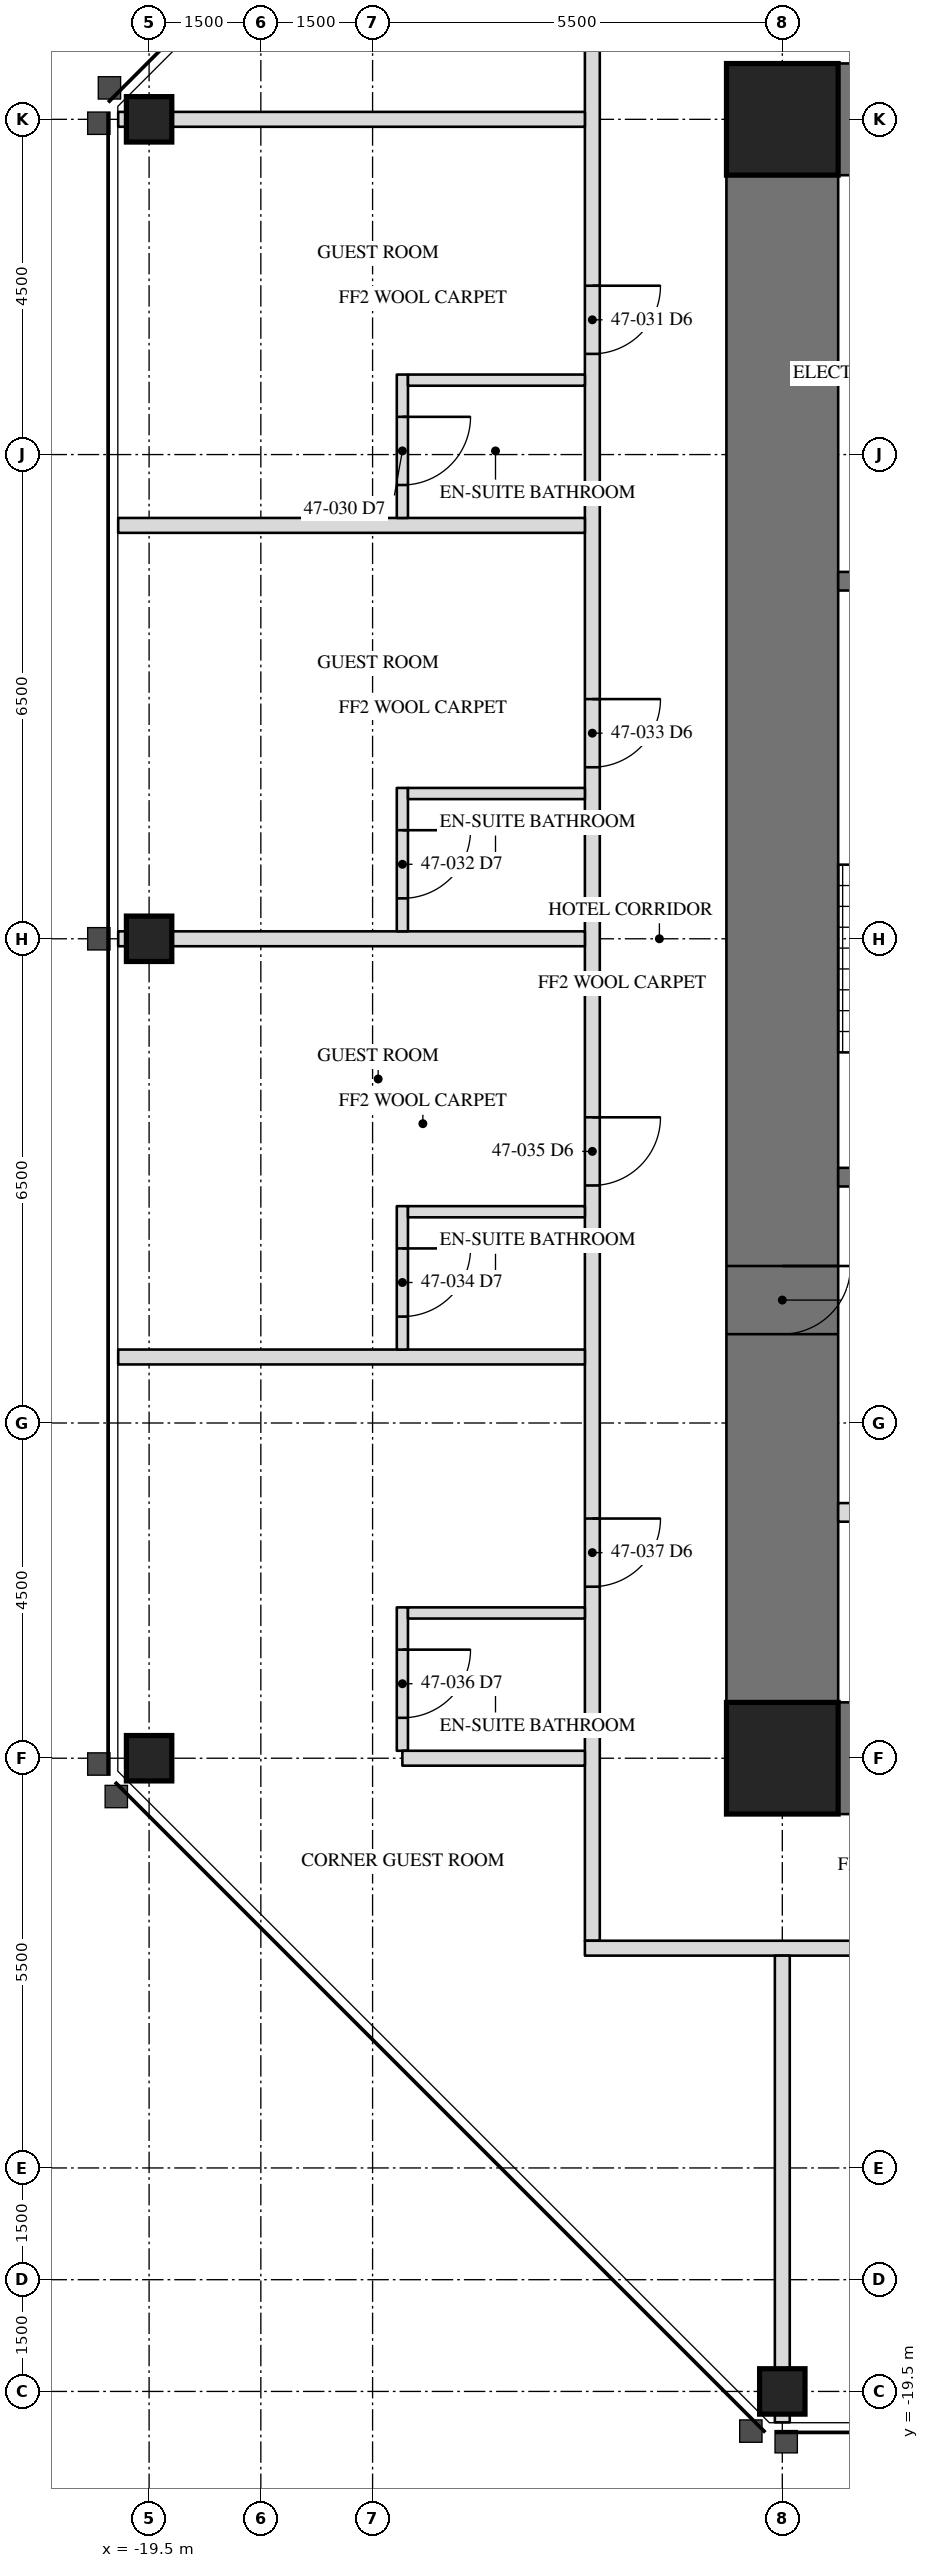
"""IFC4 building model, lengths in metres.
Left out: names, types, materials, properties, quantities, classifications, styles, units other than length and angle.
Written with IfcOpenShell. Run it as: python <this file> out.ifc"""

import sys

from ifc_helpers import new_model, si_unit, direction, frame, frame_2d, origin, origin_2d, place, context, subcontext, project, spatial, rectangle, hollow_rectangle, extrude, element, fill, save


model = new_model("IFC4")
c1 = context("Model", 3, precision=1e-05, world=origin(), true_north=direction((0.0, 1.0)))
c2 = subcontext(c1, "Body", "Model", "MODEL_VIEW")
j1 = project(units=[si_unit("LENGTHUNIT", "METRE"), si_unit("PLANEANGLEUNIT", "RADIAN")], contexts=[c1])
p1 = place(None, origin())
s1 = spatial("IfcSite", under=j1, at=p1, CompositionType="ELEMENT")
p2 = place(p1, origin())
s2 = spatial("IfcBuilding", under=s1, at=p2, CompositionType="ELEMENT")
p3 = place(p2, frame((0.0, 0.0, 201.2)))
s3 = spatial("IfcBuildingStorey", under=s2, at=p3, CompositionType="ELEMENT", Elevation=201.2)
for number, where, z_axis, x_axis in (
    (1, (-19.5, 0.0, 0.0), (0.0, 0.0, 1.0), (0.0, 1.0, 0.0)),
    (2, (-19.5, -11.0, 0.0), (0.0, 0.0, 1.0), (0.0, 1.0, 0.0)),
    (3, (-11.0, -19.5, 0.0), (0.0, 0.0, 1.0), (1.0, 0.0, 0.0)),
    (4, (-19.5, 11.0, 0.0), (0.0, 0.0, 1.0), (0.0, 1.0, 0.0)),
):
    element("IfcColumn", number, at=place(p3, frame(where, z_axis=z_axis, x_axis=x_axis)), inside=s3, PredefinedType="COLUMN", context=c2, shape_type="SweptSolid", body=[
        extrude(hollow_rectangle(XDim=0.61, YDim=0.61, WallThickness=0.076, at=origin_2d()), origin(), (0.0, 0.0, 1.0), 3.5),
    ])
p4 = place(p3, frame((-11.0, 11.0, 0.0), z_axis=(0.0, 0.0, 1.0), x_axis=(0.0, -1.0, 0.0)))
e5 = element("IfcWall", 5, at=p4, inside=s3, PredefinedType="SHEAR", context=c2, shape_type="SweptSolid", body=[
    extrude(rectangle(XDim=22.0, YDim=1.5, at=frame_2d((11.0, 0.0))), origin(), (0.0, 0.0, 1.0), 3.5),
])
p5 = place(p4, frame((15.393, 0.0, 0.0)))
e6 = element("IfcOpeningElement", 6, at=p5, cuts=e5, PredefinedType="OPENING", context=c2, shape_type="SweptSolid", body=[
    extrude(rectangle(XDim=0.915, YDim=2.134, at=frame_2d((0.458, 1.067))), frame((0.0, 0.76, 0.0), z_axis=(0.0, -1.0, 0.0), x_axis=(1.0, 0.0, 0.0)), (0.0, 0.0, 1.0), 1.52),
])
for number, where, z_axis, x_axis in (
    (7, (-6.5, 11.0, 0.0), (0.0, 0.0, 1.0), (-1.0, 0.0, 0.0)),
    (8, (-11.0, -11.0, 0.0), (0.0, 0.0, 1.0), (1.0, 0.0, 0.0)),
):
    element("IfcWall", number, at=place(p3, frame(where, z_axis=z_axis, x_axis=x_axis)), inside=s3, PredefinedType="SHEAR", context=c2, shape_type="SweptSolid", body=[
        extrude(rectangle(XDim=4.5, YDim=1.5, at=frame_2d((2.25, 0.0))), origin(), (0.0, 0.0, 1.0), 3.5),
    ])
for number, where, z_axis, x_axis in (
    (9, (-11.0, 11.0, 0.0), (0.0, 0.0, 1.0), (1.0, 0.0, 0.0)),
    (10, (-11.0, -11.0, 0.0), (0.0, 0.0, 1.0), (1.0, 0.0, 0.0)),
):
    element("IfcColumn", number, at=place(p3, frame(where, z_axis=z_axis, x_axis=x_axis)), inside=s3, PredefinedType="COLUMN", context=c2, shape_type="SweptSolid", body=[
        extrude(hollow_rectangle(XDim=1.499, YDim=1.499, WallThickness=0.102, at=origin_2d()), origin(), (0.0, 0.0, 1.0), 3.5),
    ])
p6 = place(p3, frame((-6.95, 4.8, 0.0), z_axis=(0.0, 0.0, 1.0), x_axis=(-1.0, 0.0, 0.0)))
e11 = element("IfcWall", 11, at=p6, inside=s3, PredefinedType="SOLIDWALL", context=c2, shape_type="SweptSolid", body=[
    extrude(rectangle(XDim=3.3, YDim=0.25, at=frame_2d((1.65, 0.0))), origin(), (0.0, 0.0, 1.0), 3.31),
])
p7 = place(p3, frame((-6.95, -3.2, 0.0), z_axis=(0.0, 0.0, 1.0), x_axis=(-1.0, 0.0, 0.0)))
e12 = element("IfcWall", 12, at=p7, inside=s3, PredefinedType="SOLIDWALL", context=c2, shape_type="SweptSolid", body=[
    extrude(rectangle(XDim=3.3, YDim=0.25, at=frame_2d((1.65, 0.0))), origin(), (0.0, 0.0, 1.0), 3.31),
])
p8 = place(p7, frame((1.116, 0.0, 0.0)))
e13 = element("IfcOpeningElement", 13, at=p8, cuts=e12, PredefinedType="OPENING", context=c2, shape_type="SweptSolid", body=[
    extrude(rectangle(XDim=1.067, YDim=2.134, at=frame_2d((0.533, 1.067))), frame((0.0, 0.135, 0.0), z_axis=(0.0, -1.0, 0.0), x_axis=(1.0, 0.0, 0.0)), (0.0, 0.0, 1.0), 0.27),
])
p9 = place(p3, frame((-6.95, -7.7, 0.0), z_axis=(0.0, 0.0, 1.0), x_axis=(-1.0, 0.0, 0.0)))
e14 = element("IfcWall", 14, at=p9, inside=s3, PredefinedType="PARTITIONING", context=c2, shape_type="SweptSolid", body=[
    extrude(rectangle(XDim=3.3, YDim=0.25, at=frame_2d((1.65, 0.0))), origin(), (0.0, 0.0, 1.0), 3.31),
])
p10 = place(p9, frame((0.45, 0.0, 0.0)))
e15 = element("IfcOpeningElement", 15, at=p10, cuts=e14, PredefinedType="OPENING", context=c2, shape_type="SweptSolid", body=[
    extrude(rectangle(XDim=1.219, YDim=2.134, at=frame_2d((0.609, 1.067))), frame((0.0, 0.135, 0.0), z_axis=(0.0, -1.0, 0.0), x_axis=(1.0, 0.0, 0.0)), (0.0, 0.0, 1.0), 0.27),
])
p11 = place(p3, frame((-13.55, 13.65, 0.0), z_axis=(0.0, 0.0, 1.0), x_axis=(0.0, -1.0, 0.0)))
e16 = element("IfcWall", 16, at=p11, inside=s3, PredefinedType="PARTITIONING", context=c2, shape_type="SweptSolid", body=[
    extrude(rectangle(XDim=27.1, YDim=0.2, at=frame_2d((13.55, 0.0))), origin(), (0.0, 0.0, 1.0), 3.31),
])
p12 = place(p11, frame((4.884, 0.0, 0.0)))
e17 = element("IfcOpeningElement", 17, at=p12, cuts=e16, PredefinedType="OPENING", context=c2, shape_type="SweptSolid", body=[
    extrude(rectangle(XDim=0.915, YDim=2.134, at=frame_2d((0.458, 1.067))), frame((0.0, 0.11, 0.0), z_axis=(0.0, -1.0, 0.0), x_axis=(1.0, 0.0, 0.0)), (0.0, 0.0, 1.0), 0.22),
])
p13 = place(p11, frame((10.433, 0.0, 0.0)))
e18 = element("IfcOpeningElement", 18, at=p13, cuts=e16, PredefinedType="OPENING", context=c2, shape_type="SweptSolid", body=[
    extrude(rectangle(XDim=0.915, YDim=2.134, at=frame_2d((0.458, 1.067))), frame((0.0, 0.11, 0.0), z_axis=(0.0, -1.0, 0.0), x_axis=(1.0, 0.0, 0.0)), (0.0, 0.0, 1.0), 0.22),
])
p14 = place(p11, frame((16.046, 0.0, 0.0)))
e19 = element("IfcOpeningElement", 19, at=p14, cuts=e16, PredefinedType="OPENING", context=c2, shape_type="SweptSolid", body=[
    extrude(rectangle(XDim=0.915, YDim=2.134, at=frame_2d((0.458, 1.067))), frame((0.0, 0.11, 0.0), z_axis=(0.0, -1.0, 0.0), x_axis=(1.0, 0.0, 0.0)), (0.0, 0.0, 1.0), 0.22),
])
p15 = place(p11, frame((21.433, 0.0, 0.0)))
e20 = element("IfcOpeningElement", 20, at=p15, cuts=e16, PredefinedType="OPENING", context=c2, shape_type="SweptSolid", body=[
    extrude(rectangle(XDim=0.915, YDim=2.134, at=frame_2d((0.458, 1.067))), frame((0.0, 0.11, 0.0), z_axis=(0.0, -1.0, 0.0), x_axis=(1.0, 0.0, 0.0)), (0.0, 0.0, 1.0), 0.22),
])
p16 = place(p3, frame((-13.65, -13.55, 0.0), z_axis=(0.0, 0.0, 1.0), x_axis=(1.0, 0.0, 0.0)))
e21 = element("IfcWall", 21, at=p16, inside=s3, PredefinedType="PARTITIONING", context=c2, shape_type="SweptSolid", body=[
    extrude(rectangle(XDim=27.1, YDim=0.2, at=frame_2d((13.55, 0.0))), origin(), (0.0, 0.0, 1.0), 3.31),
])
p17 = place(p16, frame((4.884, 0.0, 0.0)))
e22 = element("IfcOpeningElement", 22, at=p17, cuts=e21, PredefinedType="OPENING", context=c2, shape_type="SweptSolid", body=[
    extrude(rectangle(XDim=0.915, YDim=2.134, at=frame_2d((0.458, 1.067))), frame((0.0, 0.11, 0.0), z_axis=(0.0, -1.0, 0.0), x_axis=(1.0, 0.0, 0.0)), (0.0, 0.0, 1.0), 0.22),
])
p18 = place(p16, frame((10.433, 0.0, 0.0)))
e23 = element("IfcOpeningElement", 23, at=p18, cuts=e21, PredefinedType="OPENING", context=c2, shape_type="SweptSolid", body=[
    extrude(rectangle(XDim=0.915, YDim=2.134, at=frame_2d((0.458, 1.067))), frame((0.0, 0.11, 0.0), z_axis=(0.0, -1.0, 0.0), x_axis=(1.0, 0.0, 0.0)), (0.0, 0.0, 1.0), 0.22),
])
p19 = place(p16, frame((16.046, 0.0, 0.0)))
e24 = element("IfcOpeningElement", 24, at=p19, cuts=e21, PredefinedType="OPENING", context=c2, shape_type="SweptSolid", body=[
    extrude(rectangle(XDim=0.915, YDim=2.134, at=frame_2d((0.458, 1.067))), frame((0.0, 0.11, 0.0), z_axis=(0.0, -1.0, 0.0), x_axis=(1.0, 0.0, 0.0)), (0.0, 0.0, 1.0), 0.22),
])
p20 = place(p16, frame((21.433, 0.0, 0.0)))
e25 = element("IfcOpeningElement", 25, at=p20, cuts=e21, PredefinedType="OPENING", context=c2, shape_type="SweptSolid", body=[
    extrude(rectangle(XDim=0.915, YDim=2.134, at=frame_2d((0.458, 1.067))), frame((0.0, 0.11, 0.0), z_axis=(0.0, -1.0, 0.0), x_axis=(1.0, 0.0, 0.0)), (0.0, 0.0, 1.0), 0.22),
])
p21 = place(p3, frame((-13.65, 11.0, 0.0), z_axis=(0.0, 0.0, 1.0), x_axis=(-1.0, 0.0, 0.0)))
e26 = element("IfcWall", 26, at=p21, inside=s3, PredefinedType="PARTITIONING", context=c2, shape_type="SweptSolid", body=[
    extrude(rectangle(XDim=6.265, YDim=0.2, at=frame_2d((3.133, 0.0))), origin(), (0.0, 0.0, 1.0), 2.802),
])
p22 = place(p3, frame((-13.65, 5.549, 0.0), z_axis=(0.0, 0.0, 1.0), x_axis=(-1.0, 0.0, 0.0)))
e27 = element("IfcWall", 27, at=p22, inside=s3, PredefinedType="PARTITIONING", context=c2, shape_type="SweptSolid", body=[
    extrude(rectangle(XDim=6.265, YDim=0.2, at=frame_2d((3.133, 0.0))), origin(), (0.0, 0.0, 1.0), 3.31),
])
p23 = place(p3, frame((-13.65, 0.0, 0.0), z_axis=(0.0, 0.0, 1.0), x_axis=(-1.0, 0.0, 0.0)))
e28 = element("IfcWall", 28, at=p23, inside=s3, PredefinedType="PARTITIONING", context=c2, shape_type="SweptSolid", body=[
    extrude(rectangle(XDim=6.265, YDim=0.2, at=frame_2d((3.133, 0.0))), origin(), (0.0, 0.0, 1.0), 2.802),
])
p24 = place(p3, frame((-13.65, -5.614, 0.0), z_axis=(0.0, 0.0, 1.0), x_axis=(-1.0, 0.0, 0.0)))
e29 = element("IfcWall", 29, at=p24, inside=s3, PredefinedType="PARTITIONING", context=c2, shape_type="SweptSolid", body=[
    extrude(rectangle(XDim=6.265, YDim=0.2, at=frame_2d((3.133, 0.0))), origin(), (0.0, 0.0, 1.0), 3.31),
])
p25 = place(p3, frame((-16.1, 7.574, 0.0), z_axis=(0.0, 0.0, 1.0), x_axis=(0.0, -1.0, 0.0)))
e30 = element("IfcWall", 30, at=p25, inside=s3, PredefinedType="PARTITIONING", context=c2, shape_type="SweptSolid", body=[
    extrude(rectangle(XDim=1.925, YDim=0.15, at=frame_2d((0.962, 0.0))), origin(), (0.0, 0.0, 1.0), 3.31),
])
p26 = place(p25, frame((0.567, 0.0, 0.0)))
e31 = element("IfcOpeningElement", 31, at=p26, cuts=e30, PredefinedType="OPENING", context=c2, shape_type="SweptSolid", body=[
    extrude(rectangle(XDim=0.915, YDim=2.032, at=frame_2d((0.458, 1.016))), frame((0.0, 0.085, 0.0), z_axis=(0.0, -1.0, 0.0), x_axis=(1.0, 0.0, 0.0)), (0.0, 0.0, 1.0), 0.17),
])
p27 = place(p3, frame((-13.65, 7.499, 0.0), z_axis=(0.0, 0.0, 1.0), x_axis=(-1.0, 0.0, 0.0)))
e32 = element("IfcWall", 32, at=p27, inside=s3, PredefinedType="PARTITIONING", context=c2, shape_type="SweptSolid", body=[
    extrude(rectangle(XDim=2.375, YDim=0.15, at=frame_2d((1.188, 0.0))), origin(), (0.0, 0.0, 1.0), 3.31),
])
p28 = place(p3, frame((-16.1, 2.025, 0.0), z_axis=(0.0, 0.0, 1.0), x_axis=(0.0, -1.0, 0.0)))
e33 = element("IfcWall", 33, at=p28, inside=s3, PredefinedType="PARTITIONING", context=c2, shape_type="SweptSolid", body=[
    extrude(rectangle(XDim=1.925, YDim=0.15, at=frame_2d((0.962, 0.0))), origin(), (0.0, 0.0, 1.0), 3.31),
])
p29 = place(p28, frame((0.567, 0.0, 0.0)))
e34 = element("IfcOpeningElement", 34, at=p29, cuts=e33, PredefinedType="OPENING", context=c2, shape_type="SweptSolid", body=[
    extrude(rectangle(XDim=0.915, YDim=2.032, at=frame_2d((0.458, 1.016))), frame((0.0, 0.085, 0.0), z_axis=(0.0, -1.0, 0.0), x_axis=(1.0, 0.0, 0.0)), (0.0, 0.0, 1.0), 0.17),
])
p30 = place(p3, frame((-13.65, 1.95, 0.0), z_axis=(0.0, 0.0, 1.0), x_axis=(-1.0, 0.0, 0.0)))
e35 = element("IfcWall", 35, at=p30, inside=s3, PredefinedType="PARTITIONING", context=c2, shape_type="SweptSolid", body=[
    extrude(rectangle(XDim=2.375, YDim=0.15, at=frame_2d((1.188, 0.0))), origin(), (0.0, 0.0, 1.0), 3.31),
])
p31 = place(p3, frame((-16.1, -3.589, 0.0), z_axis=(0.0, 0.0, 1.0), x_axis=(0.0, -1.0, 0.0)))
e36 = element("IfcWall", 36, at=p31, inside=s3, PredefinedType="PARTITIONING", context=c2, shape_type="SweptSolid", body=[
    extrude(rectangle(XDim=1.925, YDim=0.15, at=frame_2d((0.962, 0.0))), origin(), (0.0, 0.0, 1.0), 3.31),
])
p32 = place(p31, frame((0.567, 0.0, 0.0)))
e37 = element("IfcOpeningElement", 37, at=p32, cuts=e36, PredefinedType="OPENING", context=c2, shape_type="SweptSolid", body=[
    extrude(rectangle(XDim=0.915, YDim=2.032, at=frame_2d((0.458, 1.016))), frame((0.0, 0.085, 0.0), z_axis=(0.0, -1.0, 0.0), x_axis=(1.0, 0.0, 0.0)), (0.0, 0.0, 1.0), 0.17),
])
p33 = place(p3, frame((-13.65, -3.664, 0.0), z_axis=(0.0, 0.0, 1.0), x_axis=(-1.0, 0.0, 0.0)))
e38 = element("IfcWall", 38, at=p33, inside=s3, PredefinedType="PARTITIONING", context=c2, shape_type="SweptSolid", body=[
    extrude(rectangle(XDim=2.375, YDim=0.15, at=frame_2d((1.188, 0.0))), origin(), (0.0, 0.0, 1.0), 2.703),
])
p34 = place(p3, frame((-16.1, -8.975, 0.0), z_axis=(0.0, 0.0, 1.0), x_axis=(0.0, -1.0, 0.0)))
e39 = element("IfcWall", 39, at=p34, inside=s3, PredefinedType="PARTITIONING", context=c2, shape_type="SweptSolid", body=[
    extrude(rectangle(XDim=1.925, YDim=0.15, at=frame_2d((0.962, 0.0))), origin(), (0.0, 0.0, 1.0), 3.31),
])
p35 = place(p34, frame((0.567, 0.0, 0.0)))
e40 = element("IfcOpeningElement", 40, at=p35, cuts=e39, PredefinedType="OPENING", context=c2, shape_type="SweptSolid", body=[
    extrude(rectangle(XDim=0.915, YDim=2.032, at=frame_2d((0.458, 1.016))), frame((0.0, 0.085, 0.0), z_axis=(0.0, -1.0, 0.0), x_axis=(1.0, 0.0, 0.0)), (0.0, 0.0, 1.0), 0.17),
])
p36 = place(p3, frame((-13.65, -9.05, 0.0), z_axis=(0.0, 0.0, 1.0), x_axis=(-1.0, 0.0, 0.0)))
e41 = element("IfcWall", 41, at=p36, inside=s3, PredefinedType="PARTITIONING", context=c2, shape_type="SweptSolid", body=[
    extrude(rectangle(XDim=2.375, YDim=0.15, at=frame_2d((1.188, 0.0))), origin(), (0.0, 0.0, 1.0), 3.31),
])
p37 = place(p3, frame((-13.65, -11.0, 0.0), z_axis=(0.0, 0.0, 1.0), x_axis=(-1.0, 0.0, 0.0)))
e42 = element("IfcWall", 42, at=p37, inside=s3, PredefinedType="PARTITIONING", context=c2, shape_type="SweptSolid", body=[
    extrude(rectangle(XDim=2.45, YDim=0.2, at=frame_2d((1.225, 0.0))), origin(), (0.0, 0.0, 1.0), 2.802),
])
p38 = place(p3, frame((-11.0, -13.65, 0.0), z_axis=(0.0, 0.0, 1.0), x_axis=(0.0, -1.0, 0.0)))
e43 = element("IfcWall", 43, at=p38, inside=s3, PredefinedType="PARTITIONING", context=c2, shape_type="SweptSolid", body=[
    extrude(rectangle(XDim=6.265, YDim=0.2, at=frame_2d((3.133, 0.0))), origin(), (0.0, 0.0, 1.0), 2.802),
])
p39 = place(p5, origin())
e44 = element("IfcDoor", 44, at=p39, inside=s3, OperationType="SINGLE_SWING_RIGHT", PredefinedType="DOOR", context=c2, shape_type="SweptSolid", body=[
    extrude(rectangle(XDim=0.915, YDim=2.134, at=frame_2d((0.458, 1.067))), frame((0.0, -0.675, 0.0), z_axis=(0.0, -1.0, 0.0), x_axis=(1.0, 0.0, 0.0)), (0.0, 0.0, 1.0), 0.05),
])
fill(e6, e44)
p40 = place(p26, origin())
e45 = element("IfcDoor", 45, at=p40, inside=s3, OperationType="SINGLE_SWING_LEFT", PredefinedType="DOOR", context=c2, shape_type="SweptSolid", body=[
    extrude(rectangle(XDim=0.915, YDim=2.032, at=frame_2d((0.458, 1.016))), frame((0.0, 0.025, 0.0), z_axis=(0.0, -1.0, 0.0), x_axis=(1.0, 0.0, 0.0)), (0.0, 0.0, 1.0), 0.05),
])
fill(e31, e45)
p41 = place(p12, origin())
e46 = element("IfcDoor", 46, at=p41, inside=s3, OperationType="SINGLE_SWING_LEFT", PredefinedType="DOOR", context=c2, shape_type="SweptSolid", body=[
    extrude(rectangle(XDim=0.915, YDim=2.134, at=frame_2d((0.458, 1.067))), frame((0.0, 0.025, 0.0), z_axis=(0.0, -1.0, 0.0), x_axis=(1.0, 0.0, 0.0)), (0.0, 0.0, 1.0), 0.05),
])
fill(e17, e46)
p42 = place(p29, origin())
e47 = element("IfcDoor", 47, at=p42, inside=s3, OperationType="SINGLE_SWING_LEFT", PredefinedType="DOOR", context=c2, shape_type="SweptSolid", body=[
    extrude(rectangle(XDim=0.915, YDim=2.032, at=frame_2d((0.458, 1.016))), frame((0.0, 0.025, 0.0), z_axis=(0.0, -1.0, 0.0), x_axis=(1.0, 0.0, 0.0)), (0.0, 0.0, 1.0), 0.05),
])
fill(e34, e47)
p43 = place(p13, origin())
e48 = element("IfcDoor", 48, at=p43, inside=s3, OperationType="SINGLE_SWING_LEFT", PredefinedType="DOOR", context=c2, shape_type="SweptSolid", body=[
    extrude(rectangle(XDim=0.915, YDim=2.134, at=frame_2d((0.458, 1.067))), frame((0.0, 0.025, 0.0), z_axis=(0.0, -1.0, 0.0), x_axis=(1.0, 0.0, 0.0)), (0.0, 0.0, 1.0), 0.05),
])
fill(e18, e48)
p44 = place(p32, origin())
e49 = element("IfcDoor", 49, at=p44, inside=s3, OperationType="SINGLE_SWING_LEFT", PredefinedType="DOOR", context=c2, shape_type="SweptSolid", body=[
    extrude(rectangle(XDim=0.915, YDim=2.032, at=frame_2d((0.458, 1.016))), frame((0.0, 0.025, 0.0), z_axis=(0.0, -1.0, 0.0), x_axis=(1.0, 0.0, 0.0)), (0.0, 0.0, 1.0), 0.05),
])
fill(e37, e49)
p45 = place(p14, origin())
e50 = element("IfcDoor", 50, at=p45, inside=s3, OperationType="SINGLE_SWING_LEFT", PredefinedType="DOOR", context=c2, shape_type="SweptSolid", body=[
    extrude(rectangle(XDim=0.915, YDim=2.134, at=frame_2d((0.458, 1.067))), frame((0.0, 0.025, 0.0), z_axis=(0.0, -1.0, 0.0), x_axis=(1.0, 0.0, 0.0)), (0.0, 0.0, 1.0), 0.05),
])
fill(e19, e50)
p46 = place(p35, origin())
e51 = element("IfcDoor", 51, at=p46, inside=s3, OperationType="SINGLE_SWING_LEFT", PredefinedType="DOOR", context=c2, shape_type="SweptSolid", body=[
    extrude(rectangle(XDim=0.915, YDim=2.032, at=frame_2d((0.458, 1.016))), frame((0.0, 0.025, 0.0), z_axis=(0.0, -1.0, 0.0), x_axis=(1.0, 0.0, 0.0)), (0.0, 0.0, 1.0), 0.05),
])
fill(e40, e51)
p47 = place(p15, origin())
e52 = element("IfcDoor", 52, at=p47, inside=s3, OperationType="SINGLE_SWING_LEFT", PredefinedType="DOOR", context=c2, shape_type="SweptSolid", body=[
    extrude(rectangle(XDim=0.915, YDim=2.134, at=frame_2d((0.458, 1.067))), frame((0.0, 0.025, 0.0), z_axis=(0.0, -1.0, 0.0), x_axis=(1.0, 0.0, 0.0)), (0.0, 0.0, 1.0), 0.05),
])
fill(e20, e52)
save(model, sys.argv[1])
